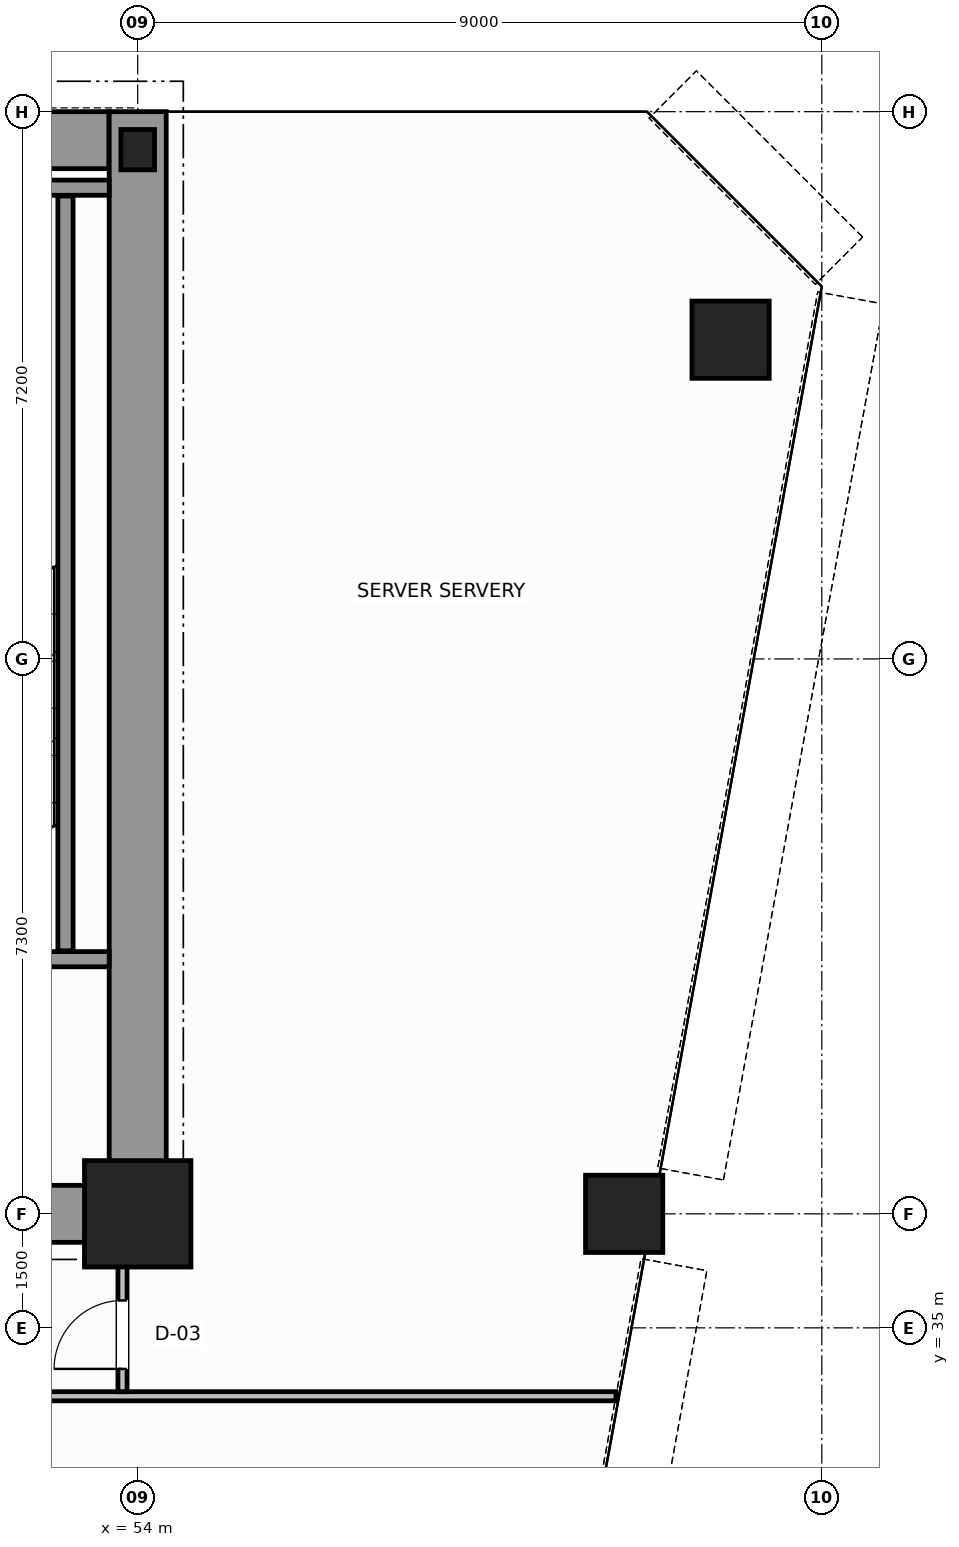
"""IFC4 building model, lengths in metres.
Left out: names, types, materials, properties, quantities, classifications, styles, units other than length and angle.
Written with IfcOpenShell. Run it as: python <this file> out.ifc"""

import sys

from ifc_helpers import new_model, si_unit, direction, frame, frame_2d, origin, origin_2d, place, context, subcontext, project, spatial, rectangle, hollow_circle, i_section, extrude, source, transform, mapped, element, fill, save


model = new_model("IFC4")
c1 = context("Model", 3, precision=1e-05, world=origin(), true_north=direction((0.0, 1.0)))
c2 = subcontext(c1, "Body", "Model", "MODEL_VIEW")
j1 = project(units=[si_unit("LENGTHUNIT", "METRE"), si_unit("PLANEANGLEUNIT", "RADIAN")], contexts=[c1])
p1 = place(None, origin())
s1 = spatial("IfcSite", under=j1, at=p1, CompositionType="ELEMENT")
p2 = place(p1, origin())
s2 = spatial("IfcBuilding", under=s1, at=p2, CompositionType="ELEMENT")
p3 = place(p2, frame((0.0, 0.0, 88.2)))
s3 = spatial("IfcBuildingStorey", under=s2, at=p3, CompositionType="ELEMENT", Elevation=88.2)
m1 = source(origin(), c2, "Body", "SweptSolid", [
    extrude(rectangle(XDim=1.4, YDim=1.4, at=origin_2d()), origin(), (0.0, 0.0, 1.0), 3.8),
])
p4 = place(p3, frame((54.0, 36.5, 0.0), z_axis=(0.0, 0.0, 1.0), x_axis=(1.0, 0.0, 0.0)))
e1 = element("IfcColumn", 1, at=p4, inside=s3, PredefinedType="COLUMN", context=c2, shape_type="MappedRepresentation", body=[
    mapped(m1, transform((0.0, 0.0, 0.0), scale=1.0)),
])
m2 = source(origin(), c2, "Body", "SweptSolid", [
    extrude(i_section(OverallWidth=0.442, OverallDepth=0.531, WebThickness=0.065, FlangeThickness=0.076, FilletRadius=0.015, at=origin_2d()), origin(), (0.0, 0.0, 1.0), 3.8),
])
p5 = place(p3, frame((54.0, 50.5, 0.0), z_axis=(0.0, 0.0, 1.0), x_axis=(1.0, 0.0, 0.0)))
e2 = element("IfcColumn", 2, at=p5, inside=s3, PredefinedType="COLUMN", context=c2, shape_type="MappedRepresentation", body=[
    mapped(m2, transform((0.0, 0.0, 0.0), scale=1.0)),
])
m3 = source(origin(), c2, "Body", "SweptSolid", [
    extrude(hollow_circle(Radius=0.508, WallThickness=0.045, at=origin_2d()), origin(), (0.0, 0.0, 1.0), 3.8),
])
for number, where, z_axis, x_axis in (
    (3, (61.8, 48.0, 0.0), (0.0, 0.0, 1.0), (1.0, 0.0, 0.0)),
    (4, (60.4, 36.5, 0.0), (0.0, 0.0, 1.0), (1.0, 0.0, 0.0)),
):
    element("IfcColumn", number, at=place(p3, frame(where, z_axis=z_axis, x_axis=x_axis)), inside=s3, PredefinedType="COLUMN", context=c2, shape_type="MappedRepresentation", body=[
        mapped(m3, transform((0.0, 0.0, 0.0), scale=1.0)),
    ])
p6 = place(p3, frame((34.002, 50.625, 0.0), z_axis=(0.0, 0.0, 1.0), x_axis=(1.0, 0.0, 0.0)))
e5 = element("IfcWall", 5, at=p6, inside=s3, PredefinedType="SHEAR", context=c2, shape_type="SweptSolid", body=[
    extrude(rectangle(XDim=19.619, YDim=0.75, at=frame_2d((9.81, 0.0))), origin(), (0.0, 0.0, 1.0), 3.8),
])
p7 = place(p3, frame((54.0, 36.5, 0.0), z_axis=(0.0, 0.0, 1.0), x_axis=(0.0, 1.0, 0.0)))
e6 = element("IfcWall", 6, at=p7, inside=s3, PredefinedType="SHEAR", context=c2, shape_type="SweptSolid", body=[
    extrude(rectangle(XDim=14.5, YDim=0.75, at=frame_2d((7.25, 0.0))), origin(), (0.0, 0.0, 1.0), 3.8),
])
p8 = place(p3, frame((49.8, 36.5, 0.0), z_axis=(0.0, 0.0, 1.0), x_axis=(1.0, 0.0, 0.0)))
e7 = element("IfcWall", 7, at=p8, inside=s3, PredefinedType="SHEAR", context=c2, shape_type="SweptSolid", body=[
    extrude(rectangle(XDim=3.805, YDim=0.75, at=frame_2d((1.902, 0.0))), origin(), (0.0, 0.0, 1.0), 2.38),
])
p9 = place(p3, frame((49.4, 39.85, 0.0), z_axis=(0.0, 0.0, 1.0), x_axis=(1.0, 0.0, 0.0)))
e8 = element("IfcWall", 8, at=p9, inside=s3, PredefinedType="SOLIDWALL", context=c2, shape_type="SweptSolid", body=[
    extrude(rectangle(XDim=4.225, YDim=0.2, at=frame_2d((2.113, 0.0))), origin(), (0.0, 0.0, 1.0), 3.8),
])
p10 = place(p9, frame((1.325, 0.0, 0.0)))
e9 = element("IfcOpeningElement", 9, at=p10, cuts=e8, PredefinedType="OPENING", context=c2, shape_type="SweptSolid", body=[
    extrude(rectangle(XDim=1.1, YDim=2.15, at=frame_2d((0.55, 1.075))), frame((0.0, 0.11, 0.0), z_axis=(0.0, -1.0, 0.0), x_axis=(1.0, 0.0, 0.0)), (0.0, 0.0, 1.0), 0.22),
])
p11 = place(p3, frame((49.4, 50.0, 0.0), z_axis=(0.0, 0.0, 1.0), x_axis=(1.0, 0.0, 0.0)))
e10 = element("IfcWall", 10, at=p11, inside=s3, PredefinedType="SOLIDWALL", context=c2, shape_type="SweptSolid", body=[
    extrude(rectangle(XDim=4.225, YDim=0.2, at=frame_2d((2.113, 0.0))), origin(), (0.0, 0.0, 1.0), 3.8),
])
p12 = place(p3, frame((53.05, 39.96, 0.0), z_axis=(0.0, 0.0, 1.0), x_axis=(0.0, 1.0, 0.0)))
e11 = element("IfcWall", 11, at=p12, inside=s3, PredefinedType="SOLIDWALL", context=c2, shape_type="SweptSolid", body=[
    extrude(rectangle(XDim=9.93, YDim=0.2, at=frame_2d((4.965, 0.0))), origin(), (0.0, 0.0, 1.0), 3.8),
])
p13 = place(p3, frame((48.46, 34.1, 0.0), z_axis=(0.0, 0.0, 1.0), x_axis=(1.0, 0.0, 0.0)))
e12 = element("IfcWall", 12, at=p13, inside=s3, PredefinedType="PARTITIONING", context=c2, shape_type="SweptSolid", body=[
    extrude(rectangle(XDim=11.832, YDim=0.12, at=frame_2d((5.916, 0.0))), origin(), (0.0, 0.0, 1.0), 3.58),
])
p14 = place(p3, frame((53.8, 34.16, 0.0), z_axis=(0.0, 0.0, 1.0), x_axis=(0.0, 1.0, 0.0)))
e13 = element("IfcWall", 13, at=p14, inside=s3, PredefinedType="PARTITIONING", context=c2, shape_type="SweptSolid", body=[
    extrude(rectangle(XDim=2.28, YDim=0.12, at=frame_2d((1.14, 0.0))), origin(), (0.0, 0.0, 1.0), 3.58),
])
p15 = place(p14, frame((0.3, 0.0, 0.0)))
e14 = element("IfcOpeningElement", 14, at=p15, cuts=e13, PredefinedType="OPENING", context=c2, shape_type="SweptSolid", body=[
    extrude(rectangle(XDim=0.9, YDim=2.15, at=frame_2d((0.45, 1.075))), frame((0.0, 0.07, 0.0), z_axis=(0.0, -1.0, 0.0), x_axis=(1.0, 0.0, 0.0)), (0.0, 0.0, 1.0), 0.14),
])
m4 = source(origin(), c2, "Body", "SweptSolid", [
    extrude(rectangle(XDim=0.9, YDim=2.15, at=frame_2d((0.45, 1.075))), frame((0.0, 0.025, 0.0), z_axis=(0.0, -1.0, 0.0), x_axis=(1.0, 0.0, 0.0)), (0.0, 0.0, 1.0), 0.05),
])
p16 = place(p15, origin())
e15 = element("IfcDoor", 15, at=p16, inside=s3, OperationType="SINGLE_SWING_RIGHT", PredefinedType="DOOR", context=c2, shape_type="MappedRepresentation", body=[
    mapped(m4, transform((0.0, 0.0, 0.0), scale=1.0)),
])
fill(e14, e15)
save(model, sys.argv[1])
